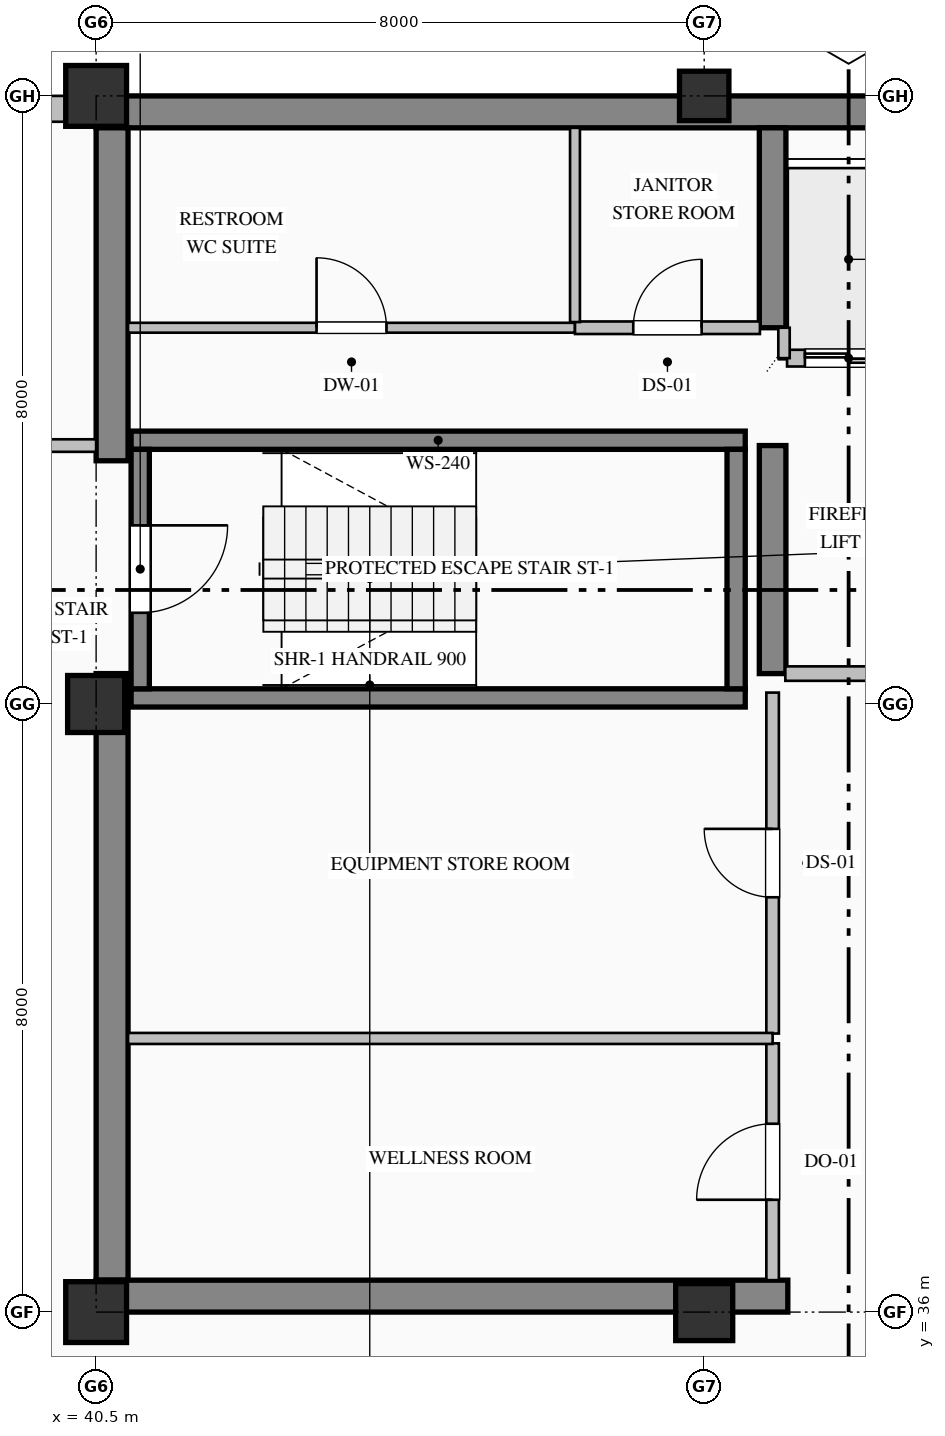
"""IFC4 building model, lengths in metres.
Left out: names, types, materials, properties, quantities, classifications, styles, units other than length and angle.
Written with IfcOpenShell. Run it as: python <this file> out.ifc"""

import sys

from ifc_helpers import new_model, si_unit, direction, frame, frame_2d, origin, origin_2d, place, context, subcontext, project, spatial, rectangle, hollow_rectangle, extrude, element, fill, save


model = new_model("IFC4")
c1 = context("Model", 3, precision=1e-05, world=origin(), true_north=direction((0.0, 1.0)))
c2 = subcontext(c1, "Body", "Model", "MODEL_VIEW")
j1 = project(units=[si_unit("LENGTHUNIT", "METRE"), si_unit("PLANEANGLEUNIT", "RADIAN")], contexts=[c1])
p1 = place(None, origin())
s1 = spatial("IfcSite", under=j1, at=p1, CompositionType="ELEMENT")
p2 = place(p1, origin())
s2 = spatial("IfcBuilding", under=s1, at=p2, CompositionType="ELEMENT")
p3 = place(p2, frame((0.0, 0.0, 355.2)))
s3 = spatial("IfcBuildingStorey", under=s2, at=p3, CompositionType="ELEMENT", Elevation=355.2)
p4 = place(p3, frame((40.5, 51.79, 0.0), z_axis=(0.0, 0.0, 1.0), x_axis=(1.0, 0.0, 0.0)))
e1 = element("IfcWall", 1, at=p4, inside=s3, PredefinedType="SHEAR", context=c2, shape_type="SweptSolid", body=[
    extrude(rectangle(XDim=23.5, YDim=0.42, at=frame_2d((11.75, 0.0))), origin(), (0.0, 0.0, 1.0), 3.785),
])
p5 = place(p3, frame((40.71, 36.42, 0.0), z_axis=(0.0, 0.0, 1.0), x_axis=(0.0, 1.0, 0.0)))
e2 = element("IfcWall", 2, at=p5, inside=s3, PredefinedType="SHEAR", context=c2, shape_type="SweptSolid", body=[
    extrude(rectangle(XDim=7.98, YDim=0.42, at=frame_2d((3.99, 0.0))), origin(), (0.0, 0.0, 1.0), 3.785),
])
p6 = place(p3, frame((40.71, 47.2, 0.0), z_axis=(0.0, 0.0, 1.0), x_axis=(0.0, 1.0, 0.0)))
e3 = element("IfcWall", 3, at=p6, inside=s3, PredefinedType="SHEAR", context=c2, shape_type="SweptSolid", body=[
    extrude(rectangle(XDim=4.38, YDim=0.42, at=frame_2d((2.19, 0.0))), origin(), (0.0, 0.0, 1.0), 3.785),
])
p7 = place(p3, frame((40.5, 36.21, 0.0), z_axis=(0.0, 0.0, 1.0), x_axis=(1.0, 0.0, 0.0)))
e4 = element("IfcWall", 4, at=p7, inside=s3, PredefinedType="SHEAR", context=c2, shape_type="SweptSolid", body=[
    extrude(rectangle(XDim=9.1, YDim=0.42, at=frame_2d((4.55, 0.0))), origin(), (0.0, 0.0, 1.0), 3.785),
])
p8 = place(p3, frame((49.4, 44.4, 0.0), z_axis=(0.0, 0.0, 1.0), x_axis=(0.0, 1.0, 0.0)))
e5 = element("IfcWall", 5, at=p8, inside=s3, PredefinedType="SHEAR", context=c2, shape_type="SweptSolid", body=[
    extrude(rectangle(XDim=3.0, YDim=0.35, at=frame_2d((1.5, 0.0))), origin(), (0.0, 0.0, 1.0), 3.785),
])
p9 = place(p3, frame((49.4, 48.95, 0.0), z_axis=(0.0, 0.0, 1.0), x_axis=(0.0, 1.0, 0.0)))
e6 = element("IfcWall", 6, at=p9, inside=s3, PredefinedType="SHEAR", context=c2, shape_type="SweptSolid", body=[
    extrude(rectangle(XDim=2.63, YDim=0.35, at=frame_2d((1.315, 0.0))), origin(), (0.0, 0.0, 1.0), 3.785),
])
p10 = place(p3, frame((40.5, 36.0, 0.0), z_axis=(0.0, 0.0, 1.0), x_axis=(1.0, 0.0, 0.0)))
e7 = element("IfcColumn", 7, at=p10, inside=s3, PredefinedType="COLUMN", context=c2, shape_type="SweptSolid", body=[
    extrude(hollow_rectangle(XDim=0.8, YDim=0.8, WallThickness=0.032, at=origin_2d()), origin(), (0.0, 0.0, 1.0), 4.0),
])
p11 = place(p3, frame((40.5, 44.0, 0.0), z_axis=(0.0, 0.0, 1.0), x_axis=(1.0, 0.0, 0.0)))
e8 = element("IfcColumn", 8, at=p11, inside=s3, PredefinedType="COLUMN", context=c2, shape_type="SweptSolid", body=[
    extrude(rectangle(XDim=0.75, YDim=0.75, at=origin_2d()), origin(), (0.0, 0.0, 1.0), 4.0),
])
p12 = place(p3, frame((40.5, 52.0, 0.0), z_axis=(0.0, 0.0, 1.0), x_axis=(1.0, 0.0, 0.0)))
e9 = element("IfcColumn", 9, at=p12, inside=s3, PredefinedType="COLUMN", context=c2, shape_type="SweptSolid", body=[
    extrude(hollow_rectangle(XDim=0.8, YDim=0.8, WallThickness=0.032, at=origin_2d()), origin(), (0.0, 0.0, 1.0), 4.0),
])
p13 = place(p3, frame((48.5, 36.0, 0.0), z_axis=(0.0, 0.0, 1.0), x_axis=(1.0, 0.0, 0.0)))
e10 = element("IfcColumn", 10, at=p13, inside=s3, PredefinedType="COLUMN", context=c2, shape_type="SweptSolid", body=[
    extrude(rectangle(XDim=0.75, YDim=0.75, at=origin_2d()), origin(), (0.0, 0.0, 1.0), 4.0),
])
p14 = place(p3, frame((48.5, 52.0, 0.0), z_axis=(0.0, 0.0, 1.0), x_axis=(1.0, 0.0, 0.0)))
e11 = element("IfcColumn", 11, at=p14, inside=s3, PredefinedType="COLUMN", context=c2, shape_type="SweptSolid", body=[
    extrude(hollow_rectangle(XDim=0.65, YDim=0.65, WallThickness=0.028, at=origin_2d()), origin(), (0.0, 0.0, 1.0), 4.0),
])
p15 = place(p3, frame((20.5, 51.83, 0.0), z_axis=(0.0, 0.0, 1.0), x_axis=(1.0, 0.0, 0.0)))
e12 = element("IfcWall", 12, at=p15, inside=s3, PredefinedType="SOLIDWALL", context=c2, shape_type="SweptSolid", body=[
    extrude(rectangle(XDim=20.02, YDim=0.34, at=frame_2d((10.01, 0.0))), origin(), (0.0, 0.0, 1.0), 3.335),
])
p16 = place(p15, frame((6.525, 0.0, 0.9)))
e13 = element("IfcOpeningElement", 13, at=p16, cuts=e12, PredefinedType="OPENING", context=c2, shape_type="SweptSolid", body=[
    extrude(rectangle(XDim=1.35, YDim=1.85, at=frame_2d((0.675, 0.925))), frame((0.0, 0.18, 0.0), z_axis=(0.0, -1.0, 0.0), x_axis=(1.0, 0.0, 0.0)), (0.0, 0.0, 1.0), 0.36),
])
for number, where, z_axis, x_axis in (
    (14, (40.96, 47.47, 0.0), (0.0, 0.0, 1.0), (1.0, 0.0, 0.0)),
    (15, (49.04, 44.08, 0.0), (0.0, 0.0, 1.0), (-1.0, 0.0, 0.0)),
):
    element("IfcWall", number, at=place(p3, frame(where, z_axis=z_axis, x_axis=x_axis)), inside=s3, PredefinedType="SOLIDWALL", context=c2, shape_type="SweptSolid", body=[
        extrude(rectangle(XDim=8.08, YDim=0.24, at=frame_2d((4.04, 0.0))), origin(), (0.0, 0.0, 1.0), 4.0),
    ])
p17 = place(p3, frame((41.08, 47.35, 0.0), z_axis=(0.0, 0.0, 1.0), x_axis=(0.0, -1.0, 0.0)))
e16 = element("IfcWall", 16, at=p17, inside=s3, PredefinedType="SOLIDWALL", context=c2, shape_type="SweptSolid", body=[
    extrude(rectangle(XDim=3.15, YDim=0.24, at=frame_2d((1.575, 0.0))), origin(), (0.0, 0.0, 1.0), 4.0),
])
p18 = place(p17, frame((1.0, 0.0, 0.0)))
e17 = element("IfcOpeningElement", 17, at=p18, cuts=e16, PredefinedType="OPENING", context=c2, shape_type="SweptSolid", body=[
    extrude(rectangle(XDim=1.15, YDim=2.2, at=frame_2d((0.575, 1.1))), frame((0.0, 0.13, 0.0), z_axis=(0.0, -1.0, 0.0), x_axis=(1.0, 0.0, 0.0)), (0.0, 0.0, 1.0), 0.26),
])
p19 = place(p3, frame((48.92, 44.2, 0.0), z_axis=(0.0, 0.0, 1.0), x_axis=(0.0, 1.0, 0.0)))
e18 = element("IfcWall", 18, at=p19, inside=s3, PredefinedType="SOLIDWALL", context=c2, shape_type="SweptSolid", body=[
    extrude(rectangle(XDim=3.15, YDim=0.24, at=frame_2d((1.575, 0.0))), origin(), (0.0, 0.0, 1.0), 4.0),
])
p20 = place(p3, frame((54.71, 48.55, 0.0), z_axis=(0.0, 0.0, 1.0), x_axis=(-1.0, 0.0, 0.0)))
e19 = element("IfcWall", 19, at=p20, inside=s3, PredefinedType="PARTITIONING", context=c2, shape_type="SweptSolid", body=[
    extrude(rectangle(XDim=5.12, YDim=0.22, at=frame_2d((2.56, 0.0))), origin(), (0.0, 0.0, 1.0), 3.785),
])
p21 = place(p20, frame((3.735, 0.0, 0.0)))
e20 = element("IfcOpeningElement", 20, at=p21, cuts=e19, PredefinedType="OPENING", context=c2, shape_type="SweptSolid", body=[
    extrude(rectangle(XDim=1.15, YDim=2.2, at=frame_2d((0.575, 1.1))), frame((0.0, 0.12, 0.0), z_axis=(0.0, -1.0, 0.0), x_axis=(1.0, 0.0, 0.0)), (0.0, 0.0, 1.0), 0.24),
])
p22 = place(p20, frame((0.935, 0.0, 0.0)))
e21 = element("IfcOpeningElement", 21, at=p22, cuts=e19, PredefinedType="OPENING", context=c2, shape_type="SweptSolid", body=[
    extrude(rectangle(XDim=1.15, YDim=2.2, at=frame_2d((0.575, 1.1))), frame((0.0, 0.12, 0.0), z_axis=(0.0, -1.0, 0.0), x_axis=(1.0, 0.0, 0.0)), (0.0, 0.0, 1.0), 0.24),
])
p23 = place(p3, frame((49.55, 48.55, 0.0), z_axis=(0.0, 0.0, 1.0), x_axis=(0.0, 1.0, 0.0)))
e22 = element("IfcWall", 22, at=p23, inside=s3, PredefinedType="PARTITIONING", context=c2, shape_type="SweptSolid", body=[
    extrude(rectangle(XDim=0.4, YDim=0.15, at=frame_2d((0.2, 0.0))), origin(), (0.0, 0.0, 1.0), 3.785),
])
p24 = place(p3, frame((37.8, 47.4, 0.0), z_axis=(0.0, 0.0, 1.0), x_axis=(1.0, 0.0, 0.0)))
e23 = element("IfcWall", 23, at=p24, inside=s3, PredefinedType="PARTITIONING", context=c2, shape_type="SweptSolid", body=[
    extrude(rectangle(XDim=2.7, YDim=0.165, at=frame_2d((1.35, 0.0))), origin(), (0.0, 0.0, 1.0), 3.785),
])
p25 = place(p24, frame((0.825, 0.0, 0.0)))
e24 = element("IfcOpeningElement", 24, at=p25, cuts=e23, PredefinedType="OPENING", context=c2, shape_type="SweptSolid", body=[
    extrude(rectangle(XDim=1.05, YDim=2.15, at=frame_2d((0.525, 1.075))), frame((0.0, 0.093, 0.0), z_axis=(0.0, -1.0, 0.0), x_axis=(1.0, 0.0, 0.0)), (0.0, 0.0, 1.0), 0.185),
])
p26 = place(p3, frame((40.92, 48.95, 0.0), z_axis=(0.0, 0.0, 1.0), x_axis=(1.0, 0.0, 0.0)))
e25 = element("IfcWall", 25, at=p26, inside=s3, PredefinedType="PARTITIONING", context=c2, shape_type="SweptSolid", body=[
    extrude(rectangle(XDim=5.88, YDim=0.13, at=frame_2d((2.94, 0.0))), origin(), (0.0, 0.0, 1.0), 3.785),
])
p27 = place(p26, frame((2.48, 0.0, 0.0)))
e26 = element("IfcOpeningElement", 26, at=p27, cuts=e25, PredefinedType="OPENING", context=c2, shape_type="SweptSolid", body=[
    extrude(rectangle(XDim=0.92, YDim=2.15, at=frame_2d((0.46, 1.075))), frame((0.0, 0.075, 0.0), z_axis=(0.0, -1.0, 0.0), x_axis=(1.0, 0.0, 0.0)), (0.0, 0.0, 1.0), 0.15),
])
p28 = place(p3, frame((46.8, 48.95, 0.0), z_axis=(0.0, 0.0, 1.0), x_axis=(1.0, 0.0, 0.0)))
e27 = element("IfcWall", 27, at=p28, inside=s3, PredefinedType="PARTITIONING", context=c2, shape_type="SweptSolid", body=[
    extrude(rectangle(XDim=2.433, YDim=0.165, at=frame_2d((1.216, 0.0))), origin(), (0.0, 0.0, 1.0), 3.785),
])
p29 = place(p28, frame((0.767, 0.0, 0.0)))
e28 = element("IfcOpeningElement", 28, at=p29, cuts=e27, PredefinedType="OPENING", context=c2, shape_type="SweptSolid", body=[
    extrude(rectangle(XDim=0.9, YDim=2.15, at=frame_2d((0.45, 1.075))), frame((0.0, 0.093, 0.0), z_axis=(0.0, -1.0, 0.0), x_axis=(1.0, 0.0, 0.0)), (0.0, 0.0, 1.0), 0.185),
])
p30 = place(p3, frame((54.733, 44.4, 0.0), z_axis=(0.0, 0.0, 1.0), x_axis=(-1.0, 0.0, 0.0)))
e29 = element("IfcWall", 29, at=p30, inside=s3, PredefinedType="PARTITIONING", context=c2, shape_type="SweptSolid", body=[
    extrude(rectangle(XDim=5.166, YDim=0.19, at=frame_2d((2.583, 0.0))), origin(), (0.0, 0.0, 1.0), 3.785),
])
p31 = place(p30, frame((2.058, 0.0, 0.0)))
e30 = element("IfcOpeningElement", 30, at=p31, cuts=e29, PredefinedType="OPENING", context=c2, shape_type="SweptSolid", body=[
    extrude(rectangle(XDim=1.05, YDim=2.15, at=frame_2d((0.525, 1.075))), frame((0.0, 0.105, 0.0), z_axis=(0.0, -1.0, 0.0), x_axis=(1.0, 0.0, 0.0)), (0.0, 0.0, 1.0), 0.21),
])
p32 = place(p3, frame((49.4, 36.42, 0.0), z_axis=(0.0, 0.0, 1.0), x_axis=(0.0, 1.0, 0.0)))
e31 = element("IfcWall", 31, at=p32, inside=s3, PredefinedType="PARTITIONING", context=c2, shape_type="SweptSolid", body=[
    extrude(rectangle(XDim=3.115, YDim=0.165, at=frame_2d((1.558, 0.0))), origin(), (0.0, 0.0, 1.0), 3.027),
])
p33 = place(p32, frame((1.058, 0.0, 0.0)))
e32 = element("IfcOpeningElement", 32, at=p33, cuts=e31, PredefinedType="OPENING", context=c2, shape_type="SweptSolid", body=[
    extrude(rectangle(XDim=1.0, YDim=2.15, at=frame_2d((0.5, 1.075))), frame((0.0, 0.093, 0.0), z_axis=(0.0, -1.0, 0.0), x_axis=(1.0, 0.0, 0.0)), (0.0, 0.0, 1.0), 0.185),
])
p34 = place(p3, frame((49.4, 39.665, 0.0), z_axis=(0.0, 0.0, 1.0), x_axis=(0.0, 1.0, 0.0)))
e33 = element("IfcWall", 33, at=p34, inside=s3, PredefinedType="PARTITIONING", context=c2, shape_type="SweptSolid", body=[
    extrude(rectangle(XDim=4.485, YDim=0.165, at=frame_2d((2.243, 0.0))), origin(), (0.0, 0.0, 1.0), 3.027),
])
p35 = place(p34, frame((1.793, 0.0, 0.0)))
e34 = element("IfcOpeningElement", 34, at=p35, cuts=e33, PredefinedType="OPENING", context=c2, shape_type="SweptSolid", body=[
    extrude(rectangle(XDim=0.9, YDim=2.15, at=frame_2d((0.45, 1.075))), frame((0.0, 0.093, 0.0), z_axis=(0.0, -1.0, 0.0), x_axis=(1.0, 0.0, 0.0)), (0.0, 0.0, 1.0), 0.185),
])
p36 = place(p3, frame((40.92, 39.6, 0.0), z_axis=(0.0, 0.0, 1.0), x_axis=(1.0, 0.0, 0.0)))
e35 = element("IfcWall", 35, at=p36, inside=s3, PredefinedType="PARTITIONING", context=c2, shape_type="SweptSolid", body=[
    extrude(rectangle(XDim=8.48, YDim=0.145, at=frame_2d((4.24, 0.0))), origin(), (0.0, 0.0, 1.0), 3.785),
])
p37 = place(p3, frame((46.8, 51.58, 0.0), z_axis=(0.0, 0.0, 1.0), x_axis=(0.0, -1.0, 0.0)))
e36 = element("IfcWall", 36, at=p37, inside=s3, PredefinedType="PARTITIONING", context=c2, shape_type="SweptSolid", body=[
    extrude(rectangle(XDim=2.556, YDim=0.13, at=frame_2d((1.278, 0.0))), origin(), (0.0, 0.0, 1.0), 3.785),
])
p38 = place(p18, origin())
e37 = element("IfcDoor", 37, at=p38, inside=s3, OperationType="SINGLE_SWING_LEFT", PredefinedType="DOOR", context=c2, shape_type="SweptSolid", body=[
    extrude(rectangle(XDim=1.15, YDim=2.2, at=frame_2d((0.575, 1.1))), frame((0.0, 0.025, 0.0), z_axis=(0.0, -1.0, 0.0), x_axis=(1.0, 0.0, 0.0)), (0.0, 0.0, 1.0), 0.05),
])
fill(e17, e37)
p39 = place(p21, origin())
e38 = element("IfcDoor", 38, at=p39, inside=s3, OperationType="DOUBLE_DOOR_SLIDING", PredefinedType="DOOR", context=c2, shape_type="SweptSolid", body=[
    extrude(rectangle(XDim=1.15, YDim=2.2, at=frame_2d((0.575, 1.1))), frame((0.0, 0.025, 0.0), z_axis=(0.0, -1.0, 0.0), x_axis=(1.0, 0.0, 0.0)), (0.0, 0.0, 1.0), 0.05),
])
fill(e20, e38)
p40 = place(p33, origin())
e39 = element("IfcDoor", 39, at=p40, inside=s3, OperationType="SINGLE_SWING_LEFT", PredefinedType="DOOR", context=c2, shape_type="SweptSolid", body=[
    extrude(rectangle(XDim=1.0, YDim=2.15, at=frame_2d((0.5, 1.075))), frame((0.0, 0.025, 0.0), z_axis=(0.0, -1.0, 0.0), x_axis=(1.0, 0.0, 0.0)), (0.0, 0.0, 1.0), 0.05),
])
fill(e32, e39)
p41 = place(p35, origin())
e40 = element("IfcDoor", 40, at=p41, inside=s3, OperationType="SINGLE_SWING_RIGHT", PredefinedType="DOOR", context=c2, shape_type="SweptSolid", body=[
    extrude(rectangle(XDim=0.9, YDim=2.15, at=frame_2d((0.45, 1.075))), frame((0.0, 0.025, 0.0), z_axis=(0.0, -1.0, 0.0), x_axis=(1.0, 0.0, 0.0)), (0.0, 0.0, 1.0), 0.05),
])
fill(e34, e40)
p42 = place(p27, origin())
e41 = element("IfcDoor", 41, at=p42, inside=s3, OperationType="SINGLE_SWING_LEFT", PredefinedType="DOOR", context=c2, shape_type="SweptSolid", body=[
    extrude(rectangle(XDim=0.92, YDim=2.15, at=frame_2d((0.46, 1.075))), frame((0.0, 0.025, 0.0), z_axis=(0.0, -1.0, 0.0), x_axis=(1.0, 0.0, 0.0)), (0.0, 0.0, 1.0), 0.05),
])
fill(e26, e41)
p43 = place(p29, origin())
e42 = element("IfcDoor", 42, at=p43, inside=s3, OperationType="SINGLE_SWING_RIGHT", PredefinedType="DOOR", context=c2, shape_type="SweptSolid", body=[
    extrude(rectangle(XDim=0.9, YDim=2.15, at=frame_2d((0.45, 1.075))), frame((0.0, 0.025, 0.0), z_axis=(0.0, -1.0, 0.0), x_axis=(1.0, 0.0, 0.0)), (0.0, 0.0, 1.0), 0.05),
])
fill(e28, e42)
save(model, sys.argv[1])
